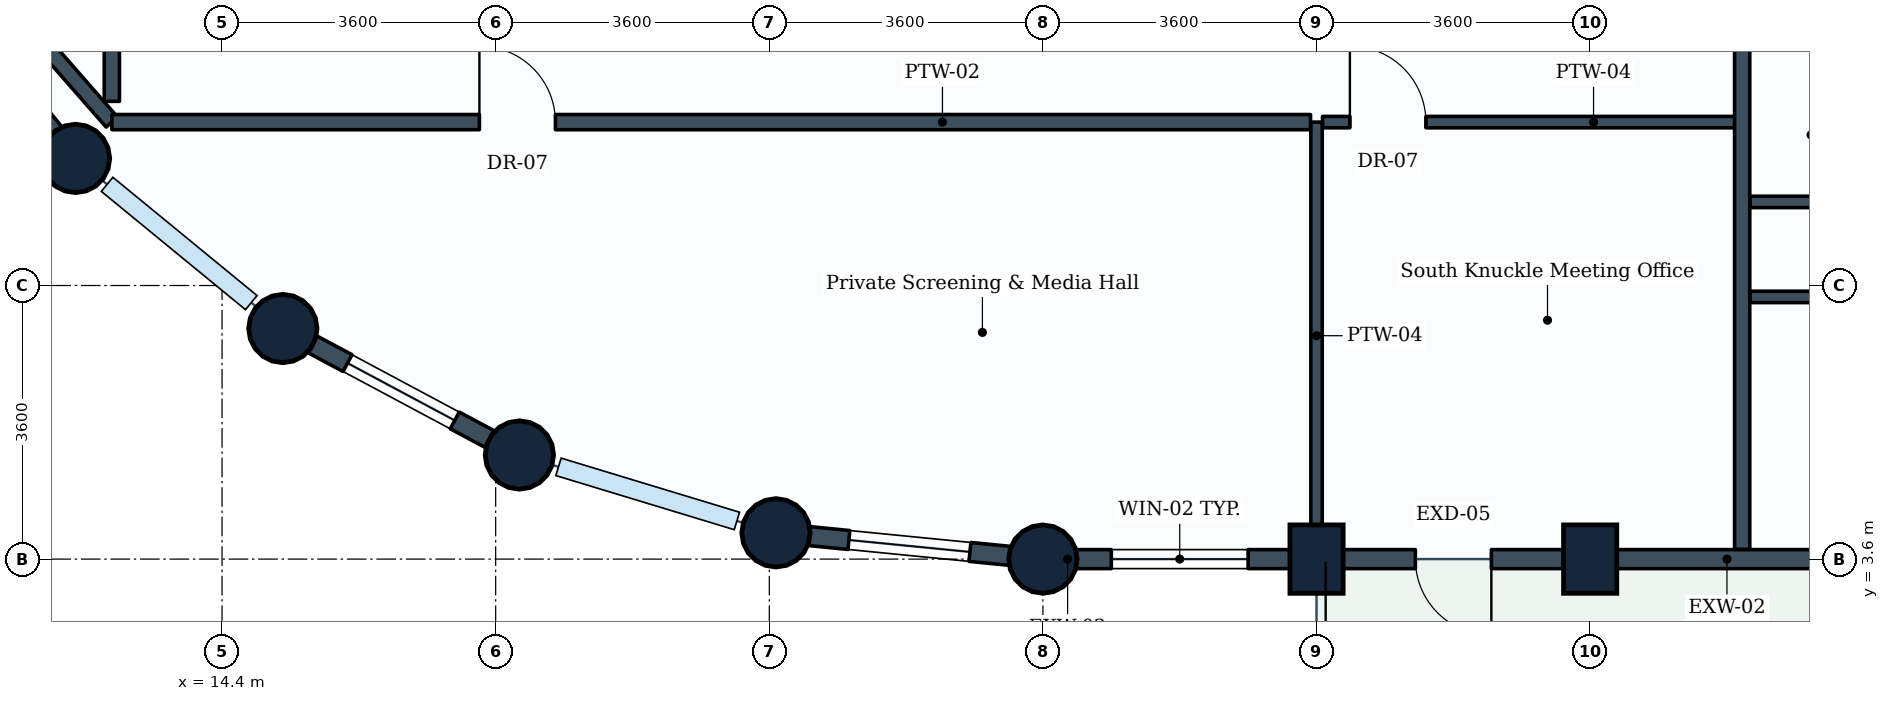
"""IFC4 building model, lengths in metres.
Left out: names, types, materials, properties, quantities, classifications, styles, units other than length and angle.
Written with IfcOpenShell. Run it as: python <this file> out.ifc"""

import sys

from ifc_helpers import new_model, si_unit, direction, frame, frame_2d, origin, origin_2d, place, context, subcontext, project, spatial, rectangle, circle, extrude, element, fill, save


model = new_model("IFC4")
c1 = context("Model", 3, precision=1e-05, world=origin(), true_north=direction((0.0, 1.0)))
c2 = subcontext(c1, "Body", "Model", "MODEL_VIEW")
j1 = project(units=[si_unit("LENGTHUNIT", "METRE"), si_unit("PLANEANGLEUNIT", "RADIAN")], contexts=[c1])
p1 = place(None, origin())
s1 = spatial("IfcSite", under=j1, at=p1, CompositionType="ELEMENT")
p2 = place(p1, origin())
s2 = spatial("IfcBuilding", under=s1, at=p2, CompositionType="ELEMENT")
p3 = place(p2, frame((0.0, 0.0, 182.4)))
s3 = spatial("IfcBuildingStorey", under=s2, at=p3, CompositionType="ELEMENT", Elevation=182.4)
for number, where, z_axis, x_axis in (
    (1, (12.472, 8.872, 0.0), (0.0, 0.0, 1.0), (1.0, 0.0, 0.0)),
    (2, (15.2, 6.634, 0.0), (0.0, 0.0, 1.0), (1.0, 0.0, 0.0)),
    (3, (18.312, 4.97, 0.0), (0.0, 0.0, 1.0), (1.0, 0.0, 0.0)),
    (4, (21.688, 3.946, 0.0), (0.0, 0.0, 1.0), (1.0, 0.0, 0.0)),
    (5, (25.2, 3.6, 0.0), (0.0, 0.0, 1.0), (1.0, 0.0, 0.0)),
):
    element("IfcColumn", number, at=place(p3, frame(where, z_axis=z_axis, x_axis=x_axis)), inside=s3, PredefinedType="COLUMN", context=c2, shape_type="SweptSolid", body=[
        extrude(circle(Radius=0.45, at=origin_2d()), origin(), (0.0, 0.0, 1.0), 3.8),
    ])
for number, where, z_axis, x_axis in (
    (6, (28.8, 3.6, 0.0), (0.0, 0.0, 1.0), (1.0, 0.0, 0.0)),
    (7, (32.4, 3.6, 0.0), (0.0, 0.0, 1.0), (1.0, 0.0, 0.0)),
):
    element("IfcColumn", number, at=place(p3, frame(where, z_axis=z_axis, x_axis=x_axis)), inside=s3, PredefinedType="COLUMN", context=c2, shape_type="SweptSolid", body=[
        extrude(rectangle(XDim=0.7, YDim=0.9, at=origin_2d()), origin(), (0.0, 0.0, 1.0), 3.8),
    ])
p4 = place(p3, frame((28.8, 3.6, 0.0), z_axis=(0.0, 0.0, 1.0), x_axis=(-1.0, 0.0, 0.0)))
e8 = element("IfcWall", 8, at=p4, inside=s3, PredefinedType="STANDARD", context=c2, shape_type="SweptSolid", body=[
    extrude(rectangle(XDim=3.6, YDim=0.25, at=frame_2d((1.8, 0.0))), origin(), (0.0, 0.0, 1.0), 2.93),
])
p5 = place(p4, frame((0.9, 0.0, 0.85)))
e9 = element("IfcOpeningElement", 9, at=p5, cuts=e8, PredefinedType="OPENING", context=c2, shape_type="SweptSolid", body=[
    extrude(rectangle(XDim=1.8, YDim=1.35, at=frame_2d((0.9, 0.675))), frame((0.0, 0.135, 0.0), z_axis=(0.0, -1.0, 0.0), x_axis=(1.0, 0.0, 0.0)), (0.0, 0.0, 1.0), 0.27),
])
p6 = place(p3, frame((32.4, 3.6, 0.0), z_axis=(0.0, 0.0, 1.0), x_axis=(-1.0, 0.0, 0.0)))
e10 = element("IfcWall", 10, at=p6, inside=s3, PredefinedType="STANDARD", context=c2, shape_type="SweptSolid", body=[
    extrude(rectangle(XDim=3.6, YDim=0.25, at=frame_2d((1.8, 0.0))), origin(), (0.0, 0.0, 1.0), 2.93),
])
p7 = place(p6, frame((1.3, 0.0, 0.0)))
e11 = element("IfcOpeningElement", 11, at=p7, cuts=e10, PredefinedType="OPENING", context=c2, shape_type="SweptSolid", body=[
    extrude(rectangle(XDim=1.0, YDim=2.1, at=frame_2d((0.5, 1.05))), frame((0.0, 0.135, 0.0), z_axis=(0.0, -1.0, 0.0), x_axis=(1.0, 0.0, 0.0)), (0.0, 0.0, 1.0), 0.27),
])
p8 = place(p3, frame((36.0, 3.6, 0.0), z_axis=(0.0, 0.0, 1.0), x_axis=(-1.0, 0.0, 0.0)))
e12 = element("IfcWall", 12, at=p8, inside=s3, PredefinedType="STANDARD", context=c2, shape_type="SweptSolid", body=[
    extrude(rectangle(XDim=3.6, YDim=0.25, at=frame_2d((1.8, 0.0))), origin(), (0.0, 0.0, 1.0), 2.93),
])
p9 = place(p3, frame((12.472, 8.872, 0.0), z_axis=(0.0, 0.0, 1.0), x_axis=(-0.634258295121, 0.773121216285, 0.0)))
e13 = element("IfcWall", 13, at=p9, inside=s3, PredefinedType="STANDARD", context=c2, shape_type="SweptSolid", body=[
    extrude(rectangle(XDim=3.529, YDim=0.25, at=frame_2d((1.764, 0.0))), origin(), (0.0, 0.0, 1.0), 2.93),
])
p10 = place(p9, frame((0.964, 0.0, 0.85)))
e14 = element("IfcOpeningElement", 14, at=p10, cuts=e13, PredefinedType="OPENING", context=c2, shape_type="SweptSolid", body=[
    extrude(rectangle(XDim=1.6, YDim=1.35, at=frame_2d((0.8, 0.675))), frame((0.0, 0.135, 0.0), z_axis=(0.0, -1.0, 0.0), x_axis=(1.0, 0.0, 0.0)), (0.0, 0.0, 1.0), 0.27),
])
p11 = place(p3, frame((18.312, 4.97, 0.0), z_axis=(0.0, 0.0, 1.0), x_axis=(-0.881846862014, 0.471535907389, 0.0)))
e15 = element("IfcWall", 15, at=p11, inside=s3, PredefinedType="STANDARD", context=c2, shape_type="SweptSolid", body=[
    extrude(rectangle(XDim=3.529, YDim=0.25, at=frame_2d((1.765, 0.0))), origin(), (0.0, 0.0, 1.0), 2.93),
])
p12 = place(p11, frame((0.964, 0.0, 0.85)))
e16 = element("IfcOpeningElement", 16, at=p12, cuts=e15, PredefinedType="OPENING", context=c2, shape_type="SweptSolid", body=[
    extrude(rectangle(XDim=1.6, YDim=1.35, at=frame_2d((0.8, 0.675))), frame((0.0, 0.135, 0.0), z_axis=(0.0, -1.0, 0.0), x_axis=(1.0, 0.0, 0.0)), (0.0, 0.0, 1.0), 0.27),
])
p13 = place(p3, frame((25.2, 3.6, 0.0), z_axis=(0.0, 0.0, 1.0), x_axis=(-0.995183369056, 0.098030923459, 0.0)))
e17 = element("IfcWall", 17, at=p13, inside=s3, PredefinedType="STANDARD", context=c2, shape_type="SweptSolid", body=[
    extrude(rectangle(XDim=3.529, YDim=0.25, at=frame_2d((1.765, 0.0))), origin(), (0.0, 0.0, 1.0), 2.93),
])
p14 = place(p13, frame((0.965, 0.0, 0.85)))
e18 = element("IfcOpeningElement", 18, at=p14, cuts=e17, PredefinedType="OPENING", context=c2, shape_type="SweptSolid", body=[
    extrude(rectangle(XDim=1.6, YDim=1.35, at=frame_2d((0.8, 0.675))), frame((0.0, 0.135, 0.0), z_axis=(0.0, -1.0, 0.0), x_axis=(1.0, 0.0, 0.0)), (0.0, 0.0, 1.0), 0.27),
])
p15 = place(p3, frame((28.8, 9.35, 0.0), z_axis=(0.0, 0.0, 1.0), x_axis=(0.0, -1.0, 0.0)))
e19 = element("IfcWall", 19, at=p15, inside=s3, PredefinedType="PARTITIONING", context=c2, shape_type="SweptSolid", body=[
    extrude(rectangle(XDim=5.621, YDim=0.15, at=frame_2d((2.811, 0.0))), origin(), (0.0, 0.0, 1.0), 3.535),
])
p16 = place(p3, frame((12.95, 9.35, 0.0), z_axis=(0.0, 0.0, 1.0), x_axis=(-0.658627575343, 0.752469080426, 0.0)))
e20 = element("IfcWall", 20, at=p16, inside=s3, PredefinedType="PARTITIONING", context=c2, shape_type="SweptSolid", body=[
    extrude(rectangle(XDim=5.903, YDim=0.2, at=frame_2d((2.952, 0.0))), origin(), (0.0, 0.0, 1.0), 2.93),
])
p17 = place(p3, frame((12.95, 9.623, 0.0), z_axis=(0.0, 0.0, 1.0), x_axis=(0.0, 1.0, 0.0)))
e21 = element("IfcWall", 21, at=p17, inside=s3, PredefinedType="PARTITIONING", context=c2, shape_type="SweptSolid", body=[
    extrude(rectangle(XDim=6.873, YDim=0.2, at=frame_2d((3.437, 0.0))), origin(), (0.0, 0.0, 1.0), 3.17),
])
p18 = place(p17, frame((3.958, 0.0, 0.0)))
e22 = element("IfcOpeningElement", 22, at=p18, cuts=e21, PredefinedType="OPENING", context=c2, shape_type="SweptSolid", body=[
    extrude(rectangle(XDim=1.0, YDim=2.1, at=frame_2d((0.5, 1.05))), frame((0.0, 0.11, 0.0), z_axis=(0.0, -1.0, 0.0), x_axis=(1.0, 0.0, 0.0)), (0.0, 0.0, 1.0), 0.22),
])
p19 = place(p3, frame((12.95, 9.35, 0.0), z_axis=(0.0, 0.0, 1.0), x_axis=(1.0, 0.0, 0.0)))
e23 = element("IfcWall", 23, at=p19, inside=s3, PredefinedType="PARTITIONING", context=c2, shape_type="SweptSolid", body=[
    extrude(rectangle(XDim=15.771, YDim=0.2, at=frame_2d((7.885, 0.0))), origin(), (0.0, 0.0, 1.0), 3.17),
])
p20 = place(p19, frame((4.836, 0.0, 0.0)))
e24 = element("IfcOpeningElement", 24, at=p20, cuts=e23, PredefinedType="OPENING", context=c2, shape_type="SweptSolid", body=[
    extrude(rectangle(XDim=1.0, YDim=2.1, at=frame_2d((0.5, 1.05))), frame((0.0, 0.11, 0.0), z_axis=(0.0, -1.0, 0.0), x_axis=(1.0, 0.0, 0.0)), (0.0, 0.0, 1.0), 0.22),
])
p21 = place(p3, frame((28.879, 9.35, 0.0), z_axis=(0.0, 0.0, 1.0), x_axis=(1.0, 0.0, 0.0)))
e25 = element("IfcWall", 25, at=p21, inside=s3, PredefinedType="PARTITIONING", context=c2, shape_type="SweptSolid", body=[
    extrude(rectangle(XDim=5.521, YDim=0.15, at=frame_2d((2.76, 0.0))), origin(), (0.0, 0.0, 1.0), 3.535),
])
p22 = place(p21, frame((0.36, 0.0, 0.0)))
e26 = element("IfcOpeningElement", 26, at=p22, cuts=e25, PredefinedType="OPENING", context=c2, shape_type="SweptSolid", body=[
    extrude(rectangle(XDim=1.0, YDim=2.1, at=frame_2d((0.5, 1.05))), frame((0.0, 0.085, 0.0), z_axis=(0.0, -1.0, 0.0), x_axis=(1.0, 0.0, 0.0)), (0.0, 0.0, 1.0), 0.17),
])
p23 = place(p3, frame((34.4, 3.729, 0.0), z_axis=(0.0, 0.0, 1.0), x_axis=(0.0, 1.0, 0.0)))
e27 = element("IfcWall", 27, at=p23, inside=s3, PredefinedType="PARTITIONING", context=c2, shape_type="SweptSolid", body=[
    extrude(rectangle(XDim=6.921, YDim=0.2, at=frame_2d((3.46, 0.0))), origin(), (0.0, 0.0, 1.0), 2.93),
])
p24 = place(p3, frame((34.504, 8.3, 0.0), z_axis=(0.0, 0.0, 1.0), x_axis=(1.0, 0.0, 0.0)))
e28 = element("IfcWall", 28, at=p24, inside=s3, PredefinedType="PARTITIONING", context=c2, shape_type="SweptSolid", body=[
    extrude(rectangle(XDim=2.217, YDim=0.15, at=frame_2d((1.108, 0.0))), origin(), (0.0, 0.0, 1.0), 3.22),
])
p25 = place(p3, frame((34.504, 7.05, 0.0), z_axis=(0.0, 0.0, 1.0), x_axis=(1.0, 0.0, 0.0)))
e29 = element("IfcWall", 29, at=p25, inside=s3, PredefinedType="PARTITIONING", context=c2, shape_type="SweptSolid", body=[
    extrude(rectangle(XDim=2.996, YDim=0.15, at=frame_2d((1.498, 0.0))), origin(), (0.0, 0.0, 1.0), 3.17),
])
p26 = place(p25, frame((1.021, 0.0, 0.0)))
e30 = element("IfcOpeningElement", 30, at=p26, cuts=e29, PredefinedType="OPENING", context=c2, shape_type="SweptSolid", body=[
    extrude(rectangle(XDim=0.85, YDim=2.1, at=frame_2d((0.425, 1.05))), frame((0.0, 0.085, 0.0), z_axis=(0.0, -1.0, 0.0), x_axis=(1.0, 0.0, 0.0)), (0.0, 0.0, 1.0), 0.17),
])
p27 = place(p5, origin())
e31 = element("IfcWindow", 31, at=p27, inside=s3, PartitioningType="SINGLE_PANEL", PredefinedType="WINDOW", context=c2, shape_type="SweptSolid", body=[
    extrude(rectangle(XDim=1.8, YDim=1.35, at=frame_2d((0.9, 0.675))), frame((0.0, 0.03, 0.0), z_axis=(0.0, -1.0, 0.0), x_axis=(1.0, 0.0, 0.0)), (0.0, 0.0, 1.0), 0.06),
])
fill(e9, e31)
p28 = place(p7, origin())
e32 = element("IfcDoor", 32, at=p28, inside=s3, OperationType="SINGLE_SWING_LEFT", PredefinedType="DOOR", context=c2, shape_type="SweptSolid", body=[
    extrude(rectangle(XDim=1.0, YDim=2.1, at=frame_2d((0.5, 1.05))), frame((0.0, 0.025, 0.0), z_axis=(0.0, -1.0, 0.0), x_axis=(1.0, 0.0, 0.0)), (0.0, 0.0, 1.0), 0.05),
])
fill(e11, e32)
p29 = place(p12, origin())
e33 = element("IfcWindow", 33, at=p29, inside=s3, PartitioningType="SINGLE_PANEL", PredefinedType="WINDOW", context=c2, shape_type="SweptSolid", body=[
    extrude(rectangle(XDim=1.6, YDim=1.35, at=frame_2d((0.8, 0.675))), frame((0.0, 0.03, 0.0), z_axis=(0.0, -1.0, 0.0), x_axis=(1.0, 0.0, 0.0)), (0.0, 0.0, 1.0), 0.06),
])
fill(e16, e33)
p30 = place(p14, origin())
e34 = element("IfcWindow", 34, at=p30, inside=s3, PartitioningType="SINGLE_PANEL", PredefinedType="WINDOW", context=c2, shape_type="SweptSolid", body=[
    extrude(rectangle(XDim=1.6, YDim=1.35, at=frame_2d((0.8, 0.675))), frame((0.0, 0.03, 0.0), z_axis=(0.0, -1.0, 0.0), x_axis=(1.0, 0.0, 0.0)), (0.0, 0.0, 1.0), 0.06),
])
fill(e18, e34)
p31 = place(p20, origin())
e35 = element("IfcDoor", 35, at=p31, inside=s3, OperationType="SINGLE_SWING_LEFT", PredefinedType="DOOR", context=c2, shape_type="SweptSolid", body=[
    extrude(rectangle(XDim=1.0, YDim=2.1, at=frame_2d((0.5, 1.05))), frame((0.0, 0.025, 0.0), z_axis=(0.0, -1.0, 0.0), x_axis=(1.0, 0.0, 0.0)), (0.0, 0.0, 1.0), 0.05),
])
fill(e24, e35)
p32 = place(p22, origin())
e36 = element("IfcDoor", 36, at=p32, inside=s3, OperationType="SINGLE_SWING_LEFT", PredefinedType="DOOR", context=c2, shape_type="SweptSolid", body=[
    extrude(rectangle(XDim=1.0, YDim=2.1, at=frame_2d((0.5, 1.05))), frame((0.0, 0.025, 0.0), z_axis=(0.0, -1.0, 0.0), x_axis=(1.0, 0.0, 0.0)), (0.0, 0.0, 1.0), 0.05),
])
fill(e26, e36)
save(model, sys.argv[1])
